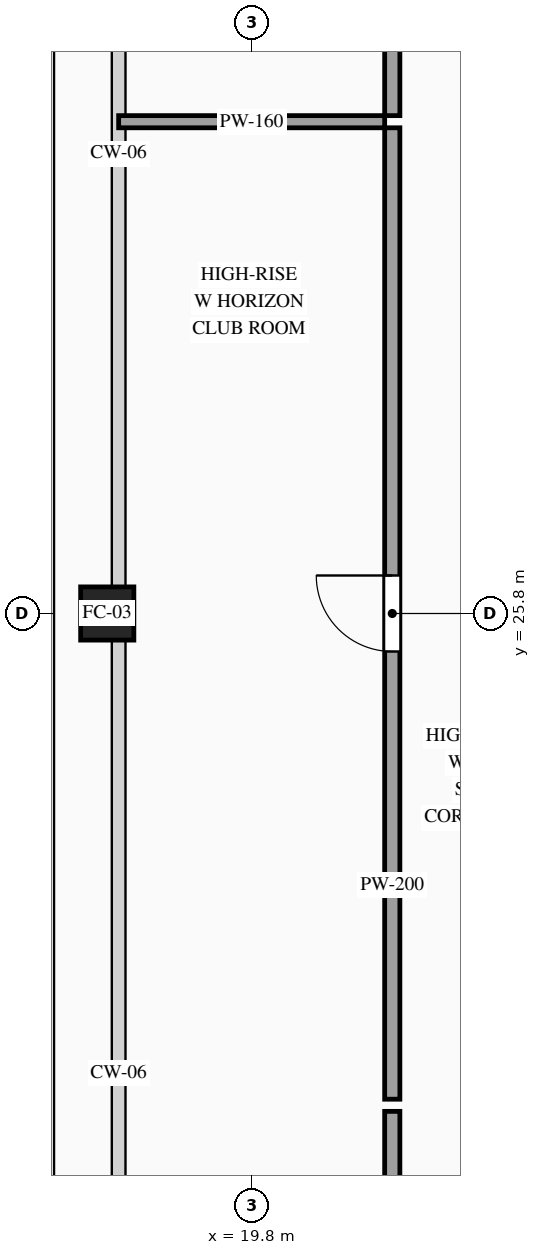
"""IFC4 building model, lengths in metres.
Left out: names, types, materials, properties, quantities, classifications, styles, units other than length and angle.
Written with IfcOpenShell. Run it as: python <this file> out.ifc"""

import sys

from ifc_helpers import new_model, si_unit, direction, frame, frame_2d, origin, origin_2d, place, context, subcontext, project, spatial, rectangle, hollow_rectangle, extrude, source, transform, mapped, element, fill, save


model = new_model("IFC4")
c1 = context("Model", 3, precision=1e-05, world=origin(), true_north=direction((0.0, 1.0)))
c2 = subcontext(c1, "Body", "Model", "MODEL_VIEW")
j1 = project(units=[si_unit("LENGTHUNIT", "METRE"), si_unit("PLANEANGLEUNIT", "RADIAN")], contexts=[c1])
p1 = place(None, origin())
s1 = spatial("IfcSite", under=j1, at=p1, CompositionType="ELEMENT")
p2 = place(p1, origin())
s2 = spatial("IfcBuilding", under=s1, at=p2, CompositionType="ELEMENT")
p3 = place(p2, frame((0.0, 0.0, 318.2)))
s3 = spatial("IfcBuildingStorey", under=s2, at=p3, CompositionType="ELEMENT", Elevation=318.2)
m1 = source(origin(), c2, "Body", "SweptSolid", [
    extrude(hollow_rectangle(XDim=0.7, YDim=0.7, WallThickness=0.032, at=origin_2d()), origin(), (0.0, 0.0, 1.0), 3.5),
])
p4 = place(p3, frame((17.9, 25.8, 0.0), z_axis=(0.0, 0.0, 1.0), x_axis=(1.0, 0.0, 0.0)))
e1 = element("IfcColumn", 1, at=p4, inside=s3, PredefinedType="COLUMN", context=c2, shape_type="MappedRepresentation", body=[
    mapped(m1, transform((0.0, 0.0, 0.0), scale=1.0)),
])
m2 = source(origin(), c2, "Body", "SweptSolid", [
    extrude(rectangle(XDim=1.7, YDim=0.2, at=frame_2d((0.85, 0.0))), origin(), (0.0, 0.0, 1.0), 3.28),
])
for number, where, z_axis, x_axis in (
    (2, (21.65, 32.35, 0.0), (0.0, 0.0, 1.0), (0.0, 1.0, 0.0)),
    (3, (21.65, 17.55, 0.0), (0.0, 0.0, 1.0), (0.0, 1.0, 0.0)),
):
    element("IfcWall", number, at=place(p3, frame(where, z_axis=z_axis, x_axis=x_axis)), inside=s3, PredefinedType="PARTITIONING", context=c2, shape_type="MappedRepresentation", body=[
        mapped(m2, transform((0.0, 0.0, 0.0), scale=1.0)),
    ])
p5 = place(p3, frame((21.65, 19.41, 0.0), z_axis=(0.0, 0.0, 1.0), x_axis=(0.0, 1.0, 0.0)))
e4 = element("IfcWall", 4, at=p5, inside=s3, PredefinedType="PARTITIONING", context=c2, shape_type="SweptSolid", body=[
    extrude(rectangle(XDim=12.78, YDim=0.2, at=frame_2d((6.39, 0.0))), origin(), (0.0, 0.0, 1.0), 3.28),
])
p6 = place(p5, frame((5.89, 0.0, 0.0)))
e5 = element("IfcOpeningElement", 5, at=p6, cuts=e4, PredefinedType="OPENING", context=c2, shape_type="SweptSolid", body=[
    extrude(rectangle(XDim=1.0, YDim=2.2, at=frame_2d((0.5, 1.1))), frame((0.0, 0.115, 0.0), z_axis=(0.0, -1.0, 0.0), x_axis=(1.0, 0.0, 0.0)), (0.0, 0.0, 1.0), 0.23),
])
m3 = source(origin(), c2, "Body", "SweptSolid", [
    extrude(rectangle(XDim=3.5, YDim=0.16, at=frame_2d((1.75, 0.0))), origin(), (0.0, 0.0, 1.0), 2.825),
])
p7 = place(p3, frame((18.05, 32.27, 0.0), z_axis=(0.0, 0.0, 1.0), x_axis=(1.0, 0.0, 0.0)))
e6 = element("IfcWall", 6, at=p7, inside=s3, PredefinedType="PARTITIONING", context=c2, shape_type="MappedRepresentation", body=[
    mapped(m3, transform((0.0, 0.0, 0.0), scale=1.0)),
])
m4 = source(origin(), c2, "Body", "SweptSolid", [
    extrude(rectangle(XDim=1.0, YDim=2.2, at=frame_2d((0.5, 1.1))), frame((0.0, 0.025, 0.0), z_axis=(0.0, -1.0, 0.0), x_axis=(1.0, 0.0, 0.0)), (0.0, 0.0, 1.0), 0.05),
])
p8 = place(p6, origin())
e7 = element("IfcDoor", 7, at=p8, inside=s3, OperationType="SINGLE_SWING_RIGHT", PredefinedType="DOOR", context=c2, shape_type="MappedRepresentation", body=[
    mapped(m4, transform((0.0, 0.0, 0.0), scale=1.0)),
])
fill(e5, e7)
save(model, sys.argv[1])
